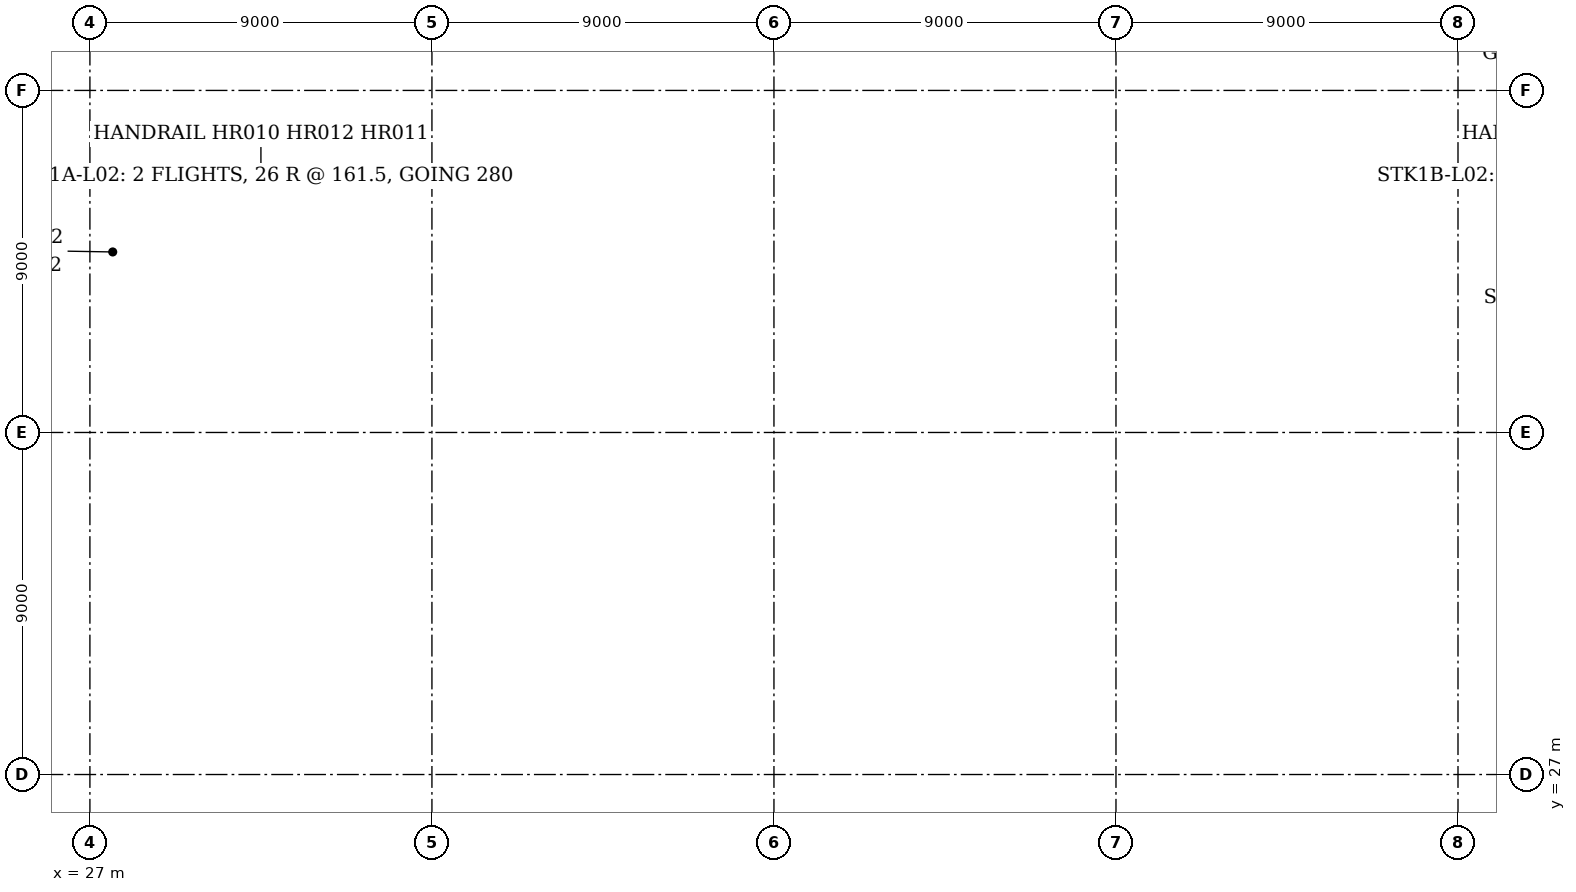
"""IFC4 building model, lengths in metres.
Left out: names, types, materials, properties, quantities, classifications, styles, units other than length and angle.
Written with IfcOpenShell. Run it as: python <this file> out.ifc"""

import sys

from ifc_helpers import new_model, si_unit, direction, frame, frame_2d, origin, origin_2d, place, context, subcontext, project, spatial, rectangle, hollow_rectangle, i_section, extrude, element, fill, save


model = new_model("IFC4")
c1 = context("Model", 3, precision=1e-05, world=origin(), true_north=direction((0.0, 1.0)))
c2 = subcontext(c1, "Body", "Model", "MODEL_VIEW")
j1 = project(units=[si_unit("LENGTHUNIT", "METRE"), si_unit("PLANEANGLEUNIT", "RADIAN")], contexts=[c1])
p1 = place(None, origin())
s1 = spatial("IfcSite", under=j1, at=p1, CompositionType="ELEMENT")
p2 = place(p1, origin())
s2 = spatial("IfcBuilding", under=s1, at=p2, CompositionType="ELEMENT")
p3 = place(p2, frame((0.0, 0.0, 9.2)))
s3 = spatial("IfcBuildingStorey", under=s2, at=p3, CompositionType="ELEMENT", Elevation=9.2)
p4 = place(p3, frame((27.0, 27.0, 0.0), z_axis=(0.0, 0.0, 1.0), x_axis=(1.0, 0.0, 0.0)))
e1 = element("IfcColumn", 1, at=p4, inside=s3, PredefinedType="COLUMN", context=c2, shape_type="SweptSolid", body=[
    extrude(hollow_rectangle(XDim=0.3, YDim=0.3, WallThickness=0.01, InnerFilletRadius=0.015, OuterFilletRadius=0.025, at=origin_2d()), origin(), (0.0, 0.0, 1.0), 4.2),
])
p5 = place(p3, frame((36.0, 27.0, 0.0), z_axis=(0.0, 0.0, 1.0), x_axis=(1.0, 0.0, 0.0)))
e2 = element("IfcColumn", 2, at=p5, inside=s3, PredefinedType="COLUMN", context=c2, shape_type="SweptSolid", body=[
    extrude(i_section(OverallWidth=0.5, OverallDepth=0.48, WebThickness=0.04, FlangeThickness=0.04, at=origin_2d()), origin(), (0.0, 0.0, 1.0), 3.335),
])
p6 = place(p3, frame((45.0, 27.0, 0.0), z_axis=(0.0, 0.0, 1.0), x_axis=(1.0, 0.0, 0.0)))
e3 = element("IfcColumn", 3, at=p6, inside=s3, PredefinedType="COLUMN", context=c2, shape_type="SweptSolid", body=[
    extrude(i_section(OverallWidth=0.254, OverallDepth=0.254, WebThickness=0.009, FlangeThickness=0.014, FilletRadius=0.014, at=origin_2d()), origin(), (0.0, 0.0, 1.0), 4.2),
])
p7 = place(p3, frame((54.0, 27.0, 0.0), z_axis=(0.0, 0.0, 1.0), x_axis=(1.0, 0.0, 0.0)))
e4 = element("IfcColumn", 4, at=p7, inside=s3, PredefinedType="COLUMN", context=c2, shape_type="SweptSolid", body=[
    extrude(i_section(OverallWidth=0.5, OverallDepth=0.48, WebThickness=0.04, FlangeThickness=0.04, at=origin_2d()), origin(), (0.0, 0.0, 1.0), 3.335),
])
p8 = place(p3, frame((63.0, 27.0, 0.0), z_axis=(0.0, 0.0, 1.0), x_axis=(1.0, 0.0, 0.0)))
e5 = element("IfcColumn", 5, at=p8, inside=s3, PredefinedType="COLUMN", context=c2, shape_type="SweptSolid", body=[
    extrude(i_section(OverallWidth=0.305, OverallDepth=0.308, WebThickness=0.01, FlangeThickness=0.015, FilletRadius=0.017, at=origin_2d()), origin(), (0.0, 0.0, 1.0), 4.2),
])
p9 = place(p3, frame((27.0, 36.0, 0.0), z_axis=(0.0, 0.0, 1.0), x_axis=(1.0, 0.0, 0.0)))
e6 = element("IfcColumn", 6, at=p9, inside=s3, PredefinedType="COLUMN", context=c2, shape_type="SweptSolid", body=[
    extrude(hollow_rectangle(XDim=0.3, YDim=0.3, WallThickness=0.01, InnerFilletRadius=0.015, OuterFilletRadius=0.025, at=origin_2d()), origin(), (0.0, 0.0, 1.0), 4.2),
])
p10 = place(p3, frame((36.0, 36.0, 0.0), z_axis=(0.0, 0.0, 1.0), x_axis=(1.0, 0.0, 0.0)))
e7 = element("IfcColumn", 7, at=p10, inside=s3, PredefinedType="COLUMN", context=c2, shape_type="SweptSolid", body=[
    extrude(i_section(OverallWidth=0.5, OverallDepth=0.48, WebThickness=0.04, FlangeThickness=0.04, at=origin_2d()), origin(), (0.0, 0.0, 1.0), 3.335),
])
p11 = place(p3, frame((45.0, 36.0, 0.0), z_axis=(0.0, 0.0, 1.0), x_axis=(1.0, 0.0, 0.0)))
e8 = element("IfcColumn", 8, at=p11, inside=s3, PredefinedType="COLUMN", context=c2, shape_type="SweptSolid", body=[
    extrude(i_section(OverallWidth=0.254, OverallDepth=0.254, WebThickness=0.009, FlangeThickness=0.014, FilletRadius=0.014, at=origin_2d()), origin(), (0.0, 0.0, 1.0), 4.2),
])
p12 = place(p3, frame((54.0, 36.0, 0.0), z_axis=(0.0, 0.0, 1.0), x_axis=(1.0, 0.0, 0.0)))
e9 = element("IfcColumn", 9, at=p12, inside=s3, PredefinedType="COLUMN", context=c2, shape_type="SweptSolid", body=[
    extrude(i_section(OverallWidth=0.5, OverallDepth=0.48, WebThickness=0.04, FlangeThickness=0.04, at=origin_2d()), origin(), (0.0, 0.0, 1.0), 3.335),
])
p13 = place(p3, frame((63.0, 36.0, 0.0), z_axis=(0.0, 0.0, 1.0), x_axis=(1.0, 0.0, 0.0)))
e10 = element("IfcColumn", 10, at=p13, inside=s3, PredefinedType="COLUMN", context=c2, shape_type="SweptSolid", body=[
    extrude(i_section(OverallWidth=0.305, OverallDepth=0.308, WebThickness=0.01, FlangeThickness=0.015, FilletRadius=0.017, at=origin_2d()), origin(), (0.0, 0.0, 1.0), 4.2),
])
p14 = place(p3, frame((45.0, 45.0, 0.0), z_axis=(0.0, 0.0, 1.0), x_axis=(1.0, 0.0, 0.0)))
e11 = element("IfcColumn", 11, at=p14, inside=s3, PredefinedType="COLUMN", context=c2, shape_type="SweptSolid", body=[
    extrude(hollow_rectangle(XDim=0.3, YDim=0.3, WallThickness=0.01, InnerFilletRadius=0.015, OuterFilletRadius=0.025, at=origin_2d()), origin(), (0.0, 0.0, 1.0), 4.2),
])
p15 = place(p3, frame((54.0, 45.0, 0.0), z_axis=(0.0, 0.0, 1.0), x_axis=(1.0, 0.0, 0.0)))
e12 = element("IfcColumn", 12, at=p15, inside=s3, PredefinedType="COLUMN", context=c2, shape_type="SweptSolid", body=[
    extrude(i_section(OverallWidth=0.5, OverallDepth=0.48, WebThickness=0.04, FlangeThickness=0.04, at=origin_2d()), origin(), (0.0, 0.0, 1.0), 3.335),
])
p16 = place(p3, frame((54.25, 44.91, 0.0), z_axis=(0.0, 0.0, 1.0), x_axis=(1.0, 0.0, 0.0)))
e13 = element("IfcWall", 13, at=p16, inside=s3, PredefinedType="SOLIDWALL", context=c2, shape_type="SweptSolid", body=[
    extrude(rectangle(XDim=8.75, YDim=0.3, at=frame_2d((4.375, 0.0))), origin(), (0.0, 0.0, 1.0), 3.578),
])
p17 = place(p3, frame((36.0, 44.91, 0.0), z_axis=(0.0, 0.0, 1.0), x_axis=(1.0, 0.0, 0.0)))
e14 = element("IfcWall", 14, at=p17, inside=s3, PredefinedType="SOLIDWALL", context=c2, shape_type="SweptSolid", body=[
    extrude(rectangle(XDim=8.85, YDim=0.3, at=frame_2d((4.425, 0.0))), origin(), (0.0, 0.0, 1.0), 3.578),
])
p18 = place(p3, frame((27.09, 36.15, 0.0), z_axis=(0.0, 0.0, 1.0), x_axis=(0.0, 1.0, 0.0)))
e15 = element("IfcWall", 15, at=p18, inside=s3, PredefinedType="SOLIDWALL", context=c2, shape_type="SweptSolid", body=[
    extrude(rectangle(XDim=4.35, YDim=0.3, at=frame_2d((2.175, 0.0))), origin(), (0.0, 0.0, 1.0), 3.578),
])
p19 = place(p3, frame((27.09, 27.15, 0.0), z_axis=(0.0, 0.0, 1.0), x_axis=(0.0, 1.0, 0.0)))
e16 = element("IfcWall", 16, at=p19, inside=s3, PredefinedType="SOLIDWALL", context=c2, shape_type="SweptSolid", body=[
    extrude(rectangle(XDim=8.7, YDim=0.3, at=frame_2d((4.35, 0.0))), origin(), (0.0, 0.0, 1.0), 3.578),
])
p20 = place(p19, frame((1.5, 0.0, 0.9)))
e17 = element("IfcOpeningElement", 17, at=p20, cuts=e16, PredefinedType="OPENING", context=c2, shape_type="SweptSolid", body=[
    extrude(rectangle(XDim=1.2, YDim=2.3, at=frame_2d((0.6, 1.15))), frame((0.0, 0.16, 0.0), z_axis=(0.0, -1.0, 0.0), x_axis=(1.0, 0.0, 0.0)), (0.0, 0.0, 1.0), 0.32),
])
p21 = place(p19, frame((6.0, 0.0, 0.9)))
e18 = element("IfcOpeningElement", 18, at=p21, cuts=e16, PredefinedType="OPENING", context=c2, shape_type="SweptSolid", body=[
    extrude(rectangle(XDim=1.2, YDim=2.3, at=frame_2d((0.6, 1.15))), frame((0.0, 0.16, 0.0), z_axis=(0.0, -1.0, 0.0), x_axis=(1.0, 0.0, 0.0)), (0.0, 0.0, 1.0), 0.32),
])
p22 = place(p3, frame((27.09, 22.5, 0.0), z_axis=(0.0, 0.0, 1.0), x_axis=(0.0, 1.0, 0.0)))
e19 = element("IfcWall", 19, at=p22, inside=s3, PredefinedType="SOLIDWALL", context=c2, shape_type="SweptSolid", body=[
    extrude(rectangle(XDim=4.35, YDim=0.3, at=frame_2d((2.175, 0.0))), origin(), (0.0, 0.0, 1.0), 3.578),
])
p23 = place(p3, frame((27.0, 40.65, 0.0), z_axis=(0.0, 0.0, 1.0), x_axis=(1.0, 0.0, 0.0)))
e20 = element("IfcWall", 20, at=p23, inside=s3, PredefinedType="SOLIDWALL", context=c2, shape_type="SweptSolid", body=[
    extrude(rectangle(XDim=9.0, YDim=0.3, at=frame_2d((4.5, 0.0))), origin(), (0.0, 0.0, 1.0), 4.2),
])
p24 = place(p3, frame((35.85, 40.8, 0.0), z_axis=(0.0, 0.0, 1.0), x_axis=(0.0, 1.0, 0.0)))
e21 = element("IfcWall", 21, at=p24, inside=s3, PredefinedType="SOLIDWALL", context=c2, shape_type="SweptSolid", body=[
    extrude(rectangle(XDim=3.9, YDim=0.3, at=frame_2d((1.95, 0.0))), origin(), (0.0, 0.0, 1.0), 4.2),
])
p25 = place(p24, frame((1.05, 0.0, 0.0)))
e22 = element("IfcOpeningElement", 22, at=p25, cuts=e21, PredefinedType="OPENING", context=c2, shape_type="SweptSolid", body=[
    extrude(rectangle(XDim=1.8, YDim=2.1, at=frame_2d((0.9, 1.05))), frame((0.0, 0.16, 0.0), z_axis=(0.0, -1.0, 0.0), x_axis=(1.0, 0.0, 0.0)), (0.0, 0.0, 1.0), 0.32),
])
p26 = place(p3, frame((27.0, 44.85, 0.0), z_axis=(0.0, 0.0, 1.0), x_axis=(1.0, 0.0, 0.0)))
e23 = element("IfcWall", 23, at=p26, inside=s3, PredefinedType="SOLIDWALL", context=c2, shape_type="SweptSolid", body=[
    extrude(rectangle(XDim=9.0, YDim=0.3, at=frame_2d((4.5, 0.0))), origin(), (0.0, 0.0, 1.0), 4.2),
])
p27 = place(p3, frame((27.15, 40.8, 0.0), z_axis=(0.0, 0.0, 1.0), x_axis=(0.0, 1.0, 0.0)))
e24 = element("IfcWall", 24, at=p27, inside=s3, PredefinedType="SOLIDWALL", context=c2, shape_type="SweptSolid", body=[
    extrude(rectangle(XDim=3.9, YDim=0.3, at=frame_2d((1.95, 0.0))), origin(), (0.0, 0.0, 1.0), 4.2),
])
for number, where, z_axis, x_axis in (
    (25, (63.0, 40.65, 0.0), (0.0, 0.0, 1.0), (1.0, 0.0, 0.0)),
    (26, (63.0, 44.85, 0.0), (0.0, 0.0, 1.0), (1.0, 0.0, 0.0)),
):
    element("IfcWall", number, at=place(p3, frame(where, z_axis=z_axis, x_axis=x_axis)), inside=s3, PredefinedType="SOLIDWALL", context=c2, shape_type="SweptSolid", body=[
        extrude(rectangle(XDim=9.0, YDim=0.3, at=frame_2d((4.5, 0.0))), origin(), (0.0, 0.0, 1.0), 4.2),
    ])
p28 = place(p3, frame((63.15, 40.8, 0.0), z_axis=(0.0, 0.0, 1.0), x_axis=(0.0, 1.0, 0.0)))
e27 = element("IfcWall", 27, at=p28, inside=s3, PredefinedType="SOLIDWALL", context=c2, shape_type="SweptSolid", body=[
    extrude(rectangle(XDim=3.9, YDim=0.3, at=frame_2d((1.95, 0.0))), origin(), (0.0, 0.0, 1.0), 4.2),
])
p29 = place(p28, frame((1.05, 0.0, 0.0)))
e28 = element("IfcOpeningElement", 28, at=p29, cuts=e27, PredefinedType="OPENING", context=c2, shape_type="SweptSolid", body=[
    extrude(rectangle(XDim=1.8, YDim=2.1, at=frame_2d((0.9, 1.05))), frame((0.0, 0.16, 0.0), z_axis=(0.0, -1.0, 0.0), x_axis=(1.0, 0.0, 0.0)), (0.0, 0.0, 1.0), 0.32),
])
p30 = place(p3, frame((27.15, 27.0, 0.0), z_axis=(0.0, 0.0, 1.0), x_axis=(1.0, 0.0, 0.0)))
e29 = element("IfcWall", 29, at=p30, inside=s3, PredefinedType="PARTITIONING", context=c2, shape_type="SweptSolid", body=[
    extrude(rectangle(XDim=8.6, YDim=0.15, at=frame_2d((4.3, 0.0))), origin(), (0.0, 0.0, 1.0), 3.502),
])
p31 = place(p3, frame((36.25, 27.0, 0.0), z_axis=(0.0, 0.0, 1.0), x_axis=(1.0, 0.0, 0.0)))
e30 = element("IfcWall", 30, at=p31, inside=s3, PredefinedType="PARTITIONING", context=c2, shape_type="SweptSolid", body=[
    extrude(rectangle(XDim=8.877, YDim=0.15, at=frame_2d((4.438, 0.0))), origin(), (0.0, 0.0, 1.0), 3.502),
])
p32 = place(p31, frame((3.25, 0.0, 0.0)))
e31 = element("IfcOpeningElement", 31, at=p32, cuts=e30, PredefinedType="OPENING", context=c2, shape_type="SweptSolid", body=[
    extrude(rectangle(XDim=2.4, YDim=2.4, at=frame_2d((1.2, 1.2))), frame((0.0, 0.085, 0.0), z_axis=(0.0, -1.0, 0.0), x_axis=(1.0, 0.0, 0.0)), (0.0, 0.0, 1.0), 0.17),
])
p33 = place(p3, frame((45.127, 27.0, 0.0), z_axis=(0.0, 0.0, 1.0), x_axis=(1.0, 0.0, 0.0)))
e32 = element("IfcWall", 32, at=p33, inside=s3, PredefinedType="PARTITIONING", context=c2, shape_type="SweptSolid", body=[
    extrude(rectangle(XDim=8.623, YDim=0.15, at=frame_2d((4.312, 0.0))), origin(), (0.0, 0.0, 1.0), 3.502),
])
p34 = place(p33, frame((3.085, 0.0, 0.0)))
e33 = element("IfcOpeningElement", 33, at=p34, cuts=e32, PredefinedType="OPENING", context=c2, shape_type="SweptSolid", body=[
    extrude(rectangle(XDim=2.4, YDim=2.4, at=frame_2d((1.2, 1.2))), frame((0.0, 0.085, 0.0), z_axis=(0.0, -1.0, 0.0), x_axis=(1.0, 0.0, 0.0)), (0.0, 0.0, 1.0), 0.17),
])
p35 = place(p3, frame((54.25, 27.0, 0.0), z_axis=(0.0, 0.0, 1.0), x_axis=(1.0, 0.0, 0.0)))
e34 = element("IfcWall", 34, at=p35, inside=s3, PredefinedType="PARTITIONING", context=c2, shape_type="SweptSolid", body=[
    extrude(rectangle(XDim=8.597, YDim=0.15, at=frame_2d((4.299, 0.0))), origin(), (0.0, 0.0, 1.0), 3.502),
])
p36 = place(p3, frame((36.0, 36.24, 0.0), z_axis=(0.0, 0.0, 1.0), x_axis=(0.0, 1.0, 0.0)))
e35 = element("IfcWall", 35, at=p36, inside=s3, PredefinedType="PARTITIONING", context=c2, shape_type="SweptSolid", body=[
    extrude(rectangle(XDim=4.26, YDim=0.2, at=frame_2d((2.13, 0.0))), origin(), (0.0, 0.0, 1.0), 4.035),
])
p37 = place(p36, frame((0.95, 0.0, 0.0)))
e36 = element("IfcOpeningElement", 36, at=p37, cuts=e35, PredefinedType="OPENING", context=c2, shape_type="SweptSolid", body=[
    extrude(rectangle(XDim=2.4, YDim=2.4, at=frame_2d((1.2, 1.2))), frame((0.0, 0.11, 0.0), z_axis=(0.0, -1.0, 0.0), x_axis=(1.0, 0.0, 0.0)), (0.0, 0.0, 1.0), 0.22),
])
p38 = place(p3, frame((36.25, 36.0, 0.0), z_axis=(0.0, 0.0, 1.0), x_axis=(1.0, 0.0, 0.0)))
e37 = element("IfcWall", 37, at=p38, inside=s3, PredefinedType="PARTITIONING", context=c2, shape_type="SweptSolid", body=[
    extrude(rectangle(XDim=4.25, YDim=0.2, at=frame_2d((2.125, 0.0))), origin(), (0.0, 0.0, 1.0), 3.502),
])
p39 = place(p3, frame((40.5, 36.0, 0.0), z_axis=(0.0, 0.0, 1.0), x_axis=(1.0, 0.0, 0.0)))
e38 = element("IfcWall", 38, at=p39, inside=s3, PredefinedType="PARTITIONING", context=c2, shape_type="SweptSolid", body=[
    extrude(rectangle(XDim=4.373, YDim=0.15, at=frame_2d((2.187, 0.0))), origin(), (0.0, 0.0, 1.0), 3.502),
])
p40 = place(p3, frame((47.938, 36.0, 0.0), z_axis=(0.0, 0.0, 1.0), x_axis=(1.0, 0.0, 0.0)))
e39 = element("IfcWall", 39, at=p40, inside=s3, PredefinedType="PARTITIONING", context=c2, shape_type="SweptSolid", body=[
    extrude(rectangle(XDim=3.0, YDim=0.15, at=frame_2d((1.5, 0.0))), origin(), (0.0, 0.0, 1.0), 3.502),
])
p41 = place(p3, frame((54.25, 36.0, 0.0), z_axis=(0.0, 0.0, 1.0), x_axis=(1.0, 0.0, 0.0)))
e40 = element("IfcWall", 40, at=p41, inside=s3, PredefinedType="PARTITIONING", context=c2, shape_type="SweptSolid", body=[
    extrude(rectangle(XDim=4.25, YDim=0.15, at=frame_2d((2.125, 0.0))), origin(), (0.0, 0.0, 1.0), 3.502),
])
p42 = place(p3, frame((58.5, 36.0, 0.0), z_axis=(0.0, 0.0, 1.0), x_axis=(1.0, 0.0, 0.0)))
e41 = element("IfcWall", 41, at=p42, inside=s3, PredefinedType="PARTITIONING", context=c2, shape_type="SweptSolid", body=[
    extrude(rectangle(XDim=4.347, YDim=0.2, at=frame_2d((2.174, 0.0))), origin(), (0.0, 0.0, 1.0), 3.502),
])
p43 = place(p42, frame((0.985, 0.0, 0.0)))
e42 = element("IfcOpeningElement", 42, at=p43, cuts=e41, PredefinedType="OPENING", context=c2, shape_type="SweptSolid", body=[
    extrude(rectangle(XDim=2.4, YDim=2.4, at=frame_2d((1.2, 1.2))), frame((0.0, 0.11, 0.0), z_axis=(0.0, -1.0, 0.0), x_axis=(1.0, 0.0, 0.0)), (0.0, 0.0, 1.0), 0.22),
])
p44 = place(p3, frame((63.0, 30.0, 0.0), z_axis=(0.0, 0.0, 1.0), x_axis=(0.0, 1.0, 0.0)))
e43 = element("IfcWall", 43, at=p44, inside=s3, PredefinedType="PARTITIONING", context=c2, shape_type="SweptSolid", body=[
    extrude(rectangle(XDim=3.0, YDim=0.2, at=frame_2d((1.5, 0.0))), origin(), (0.0, 0.0, 1.0), 3.502),
])
p45 = place(p44, frame((0.55, 0.0, 0.0)))
e44 = element("IfcOpeningElement", 44, at=p45, cuts=e43, PredefinedType="OPENING", context=c2, shape_type="SweptSolid", body=[
    extrude(rectangle(XDim=1.8, YDim=2.1, at=frame_2d((0.9, 1.05))), frame((0.0, 0.11, 0.0), z_axis=(0.0, -1.0, 0.0), x_axis=(1.0, 0.0, 0.0)), (0.0, 0.0, 1.0), 0.22),
])
p46 = place(p3, frame((40.5, 39.0, 0.0), z_axis=(0.0, 0.0, 1.0), x_axis=(0.0, 1.0, 0.0)))
e45 = element("IfcWall", 45, at=p46, inside=s3, PredefinedType="PARTITIONING", context=c2, shape_type="SweptSolid", body=[
    extrude(rectangle(XDim=3.0, YDim=0.15, at=frame_2d((1.5, 0.0))), origin(), (0.0, 0.0, 1.0), 3.502),
])
p47 = place(p46, frame((0.35, 0.0, 0.0)))
e46 = element("IfcOpeningElement", 46, at=p47, cuts=e45, PredefinedType="OPENING", context=c2, shape_type="SweptSolid", body=[
    extrude(rectangle(XDim=1.0, YDim=2.1, at=frame_2d((0.5, 1.05))), frame((0.0, 0.085, 0.0), z_axis=(0.0, -1.0, 0.0), x_axis=(1.0, 0.0, 0.0)), (0.0, 0.0, 1.0), 0.17),
])
p48 = place(p3, frame((58.5, 39.0, 0.0), z_axis=(0.0, 0.0, 1.0), x_axis=(0.0, 1.0, 0.0)))
e47 = element("IfcWall", 47, at=p48, inside=s3, PredefinedType="PARTITIONING", context=c2, shape_type="SweptSolid", body=[
    extrude(rectangle(XDim=3.0, YDim=0.15, at=frame_2d((1.5, 0.0))), origin(), (0.0, 0.0, 1.0), 3.502),
])
p49 = place(p20, origin())
e48 = element("IfcWindow", 48, at=p49, inside=s3, PartitioningType="SINGLE_PANEL", PredefinedType="WINDOW", context=c2, shape_type="SweptSolid", body=[
    extrude(rectangle(XDim=1.2, YDim=2.3, at=frame_2d((0.6, 1.15))), frame((0.0, 0.03, 0.0), z_axis=(0.0, -1.0, 0.0), x_axis=(1.0, 0.0, 0.0)), (0.0, 0.0, 1.0), 0.06),
])
fill(e17, e48)
p50 = place(p21, origin())
e49 = element("IfcWindow", 49, at=p50, inside=s3, PartitioningType="SINGLE_PANEL", PredefinedType="WINDOW", context=c2, shape_type="SweptSolid", body=[
    extrude(rectangle(XDim=1.2, YDim=2.3, at=frame_2d((0.6, 1.15))), frame((0.0, 0.03, 0.0), z_axis=(0.0, -1.0, 0.0), x_axis=(1.0, 0.0, 0.0)), (0.0, 0.0, 1.0), 0.06),
])
fill(e18, e49)
p51 = place(p25, origin())
e50 = element("IfcDoor", 50, at=p51, inside=s3, OperationType="DOUBLE_DOOR_SINGLE_SWING", PredefinedType="DOOR", context=c2, shape_type="SweptSolid", body=[
    extrude(rectangle(XDim=1.8, YDim=2.1, at=frame_2d((0.9, 1.05))), frame((0.0, 0.025, 0.0), z_axis=(0.0, -1.0, 0.0), x_axis=(1.0, 0.0, 0.0)), (0.0, 0.0, 1.0), 0.05),
])
fill(e22, e50)
p52 = place(p29, frame((1.8, 0.0, 0.0), z_axis=(0.0, 0.0, 1.0), x_axis=(-1.0, 0.0, 0.0)))
e51 = element("IfcDoor", 51, at=p52, inside=s3, OperationType="DOUBLE_DOOR_SINGLE_SWING", PredefinedType="DOOR", context=c2, shape_type="SweptSolid", body=[
    extrude(rectangle(XDim=1.8, YDim=2.1, at=frame_2d((0.9, 1.05))), frame((0.0, 0.025, 0.0), z_axis=(0.0, -1.0, 0.0), x_axis=(1.0, 0.0, 0.0)), (0.0, 0.0, 1.0), 0.05),
])
fill(e28, e51)
p53 = place(p32, origin())
e52 = element("IfcDoor", 52, at=p53, inside=s3, OperationType="DOUBLE_DOOR_SINGLE_SWING", PredefinedType="DOOR", context=c2, shape_type="SweptSolid", body=[
    extrude(rectangle(XDim=2.4, YDim=2.4, at=frame_2d((1.2, 1.2))), frame((0.0, 0.025, 0.0), z_axis=(0.0, -1.0, 0.0), x_axis=(1.0, 0.0, 0.0)), (0.0, 0.0, 1.0), 0.05),
])
fill(e31, e52)
p54 = place(p34, origin())
e53 = element("IfcDoor", 53, at=p54, inside=s3, OperationType="DOUBLE_DOOR_SINGLE_SWING", PredefinedType="DOOR", context=c2, shape_type="SweptSolid", body=[
    extrude(rectangle(XDim=2.4, YDim=2.4, at=frame_2d((1.2, 1.2))), frame((0.0, 0.025, 0.0), z_axis=(0.0, -1.0, 0.0), x_axis=(1.0, 0.0, 0.0)), (0.0, 0.0, 1.0), 0.05),
])
fill(e33, e53)
p55 = place(p37, frame((2.4, 0.0, 0.0), z_axis=(0.0, 0.0, 1.0), x_axis=(-1.0, 0.0, 0.0)))
e54 = element("IfcDoor", 54, at=p55, inside=s3, OperationType="DOUBLE_DOOR_SINGLE_SWING", PredefinedType="DOOR", context=c2, shape_type="SweptSolid", body=[
    extrude(rectangle(XDim=2.4, YDim=2.4, at=frame_2d((1.2, 1.2))), frame((0.0, 0.025, 0.0), z_axis=(0.0, -1.0, 0.0), x_axis=(1.0, 0.0, 0.0)), (0.0, 0.0, 1.0), 0.05),
])
fill(e36, e54)
p56 = place(p43, frame((2.4, 0.0, 0.0), z_axis=(0.0, 0.0, 1.0), x_axis=(-1.0, 0.0, 0.0)))
e55 = element("IfcDoor", 55, at=p56, inside=s3, OperationType="DOUBLE_DOOR_SINGLE_SWING", PredefinedType="DOOR", context=c2, shape_type="SweptSolid", body=[
    extrude(rectangle(XDim=2.4, YDim=2.4, at=frame_2d((1.2, 1.2))), frame((0.0, 0.025, 0.0), z_axis=(0.0, -1.0, 0.0), x_axis=(1.0, 0.0, 0.0)), (0.0, 0.0, 1.0), 0.05),
])
fill(e42, e55)
p57 = place(p45, origin())
e56 = element("IfcDoor", 56, at=p57, inside=s3, OperationType="DOUBLE_DOOR_SINGLE_SWING", PredefinedType="DOOR", context=c2, shape_type="SweptSolid", body=[
    extrude(rectangle(XDim=1.8, YDim=2.1, at=frame_2d((0.9, 1.05))), frame((0.0, 0.025, 0.0), z_axis=(0.0, -1.0, 0.0), x_axis=(1.0, 0.0, 0.0)), (0.0, 0.0, 1.0), 0.05),
])
fill(e44, e56)
p58 = place(p47, frame((1.0, 0.0, 0.0), z_axis=(0.0, 0.0, 1.0), x_axis=(-1.0, 0.0, 0.0)))
e57 = element("IfcDoor", 57, at=p58, inside=s3, OperationType="SINGLE_SWING_LEFT", PredefinedType="DOOR", context=c2, shape_type="SweptSolid", body=[
    extrude(rectangle(XDim=1.0, YDim=2.1, at=frame_2d((0.5, 1.05))), frame((0.0, 0.025, 0.0), z_axis=(0.0, -1.0, 0.0), x_axis=(1.0, 0.0, 0.0)), (0.0, 0.0, 1.0), 0.05),
])
fill(e46, e57)
save(model, sys.argv[1])
